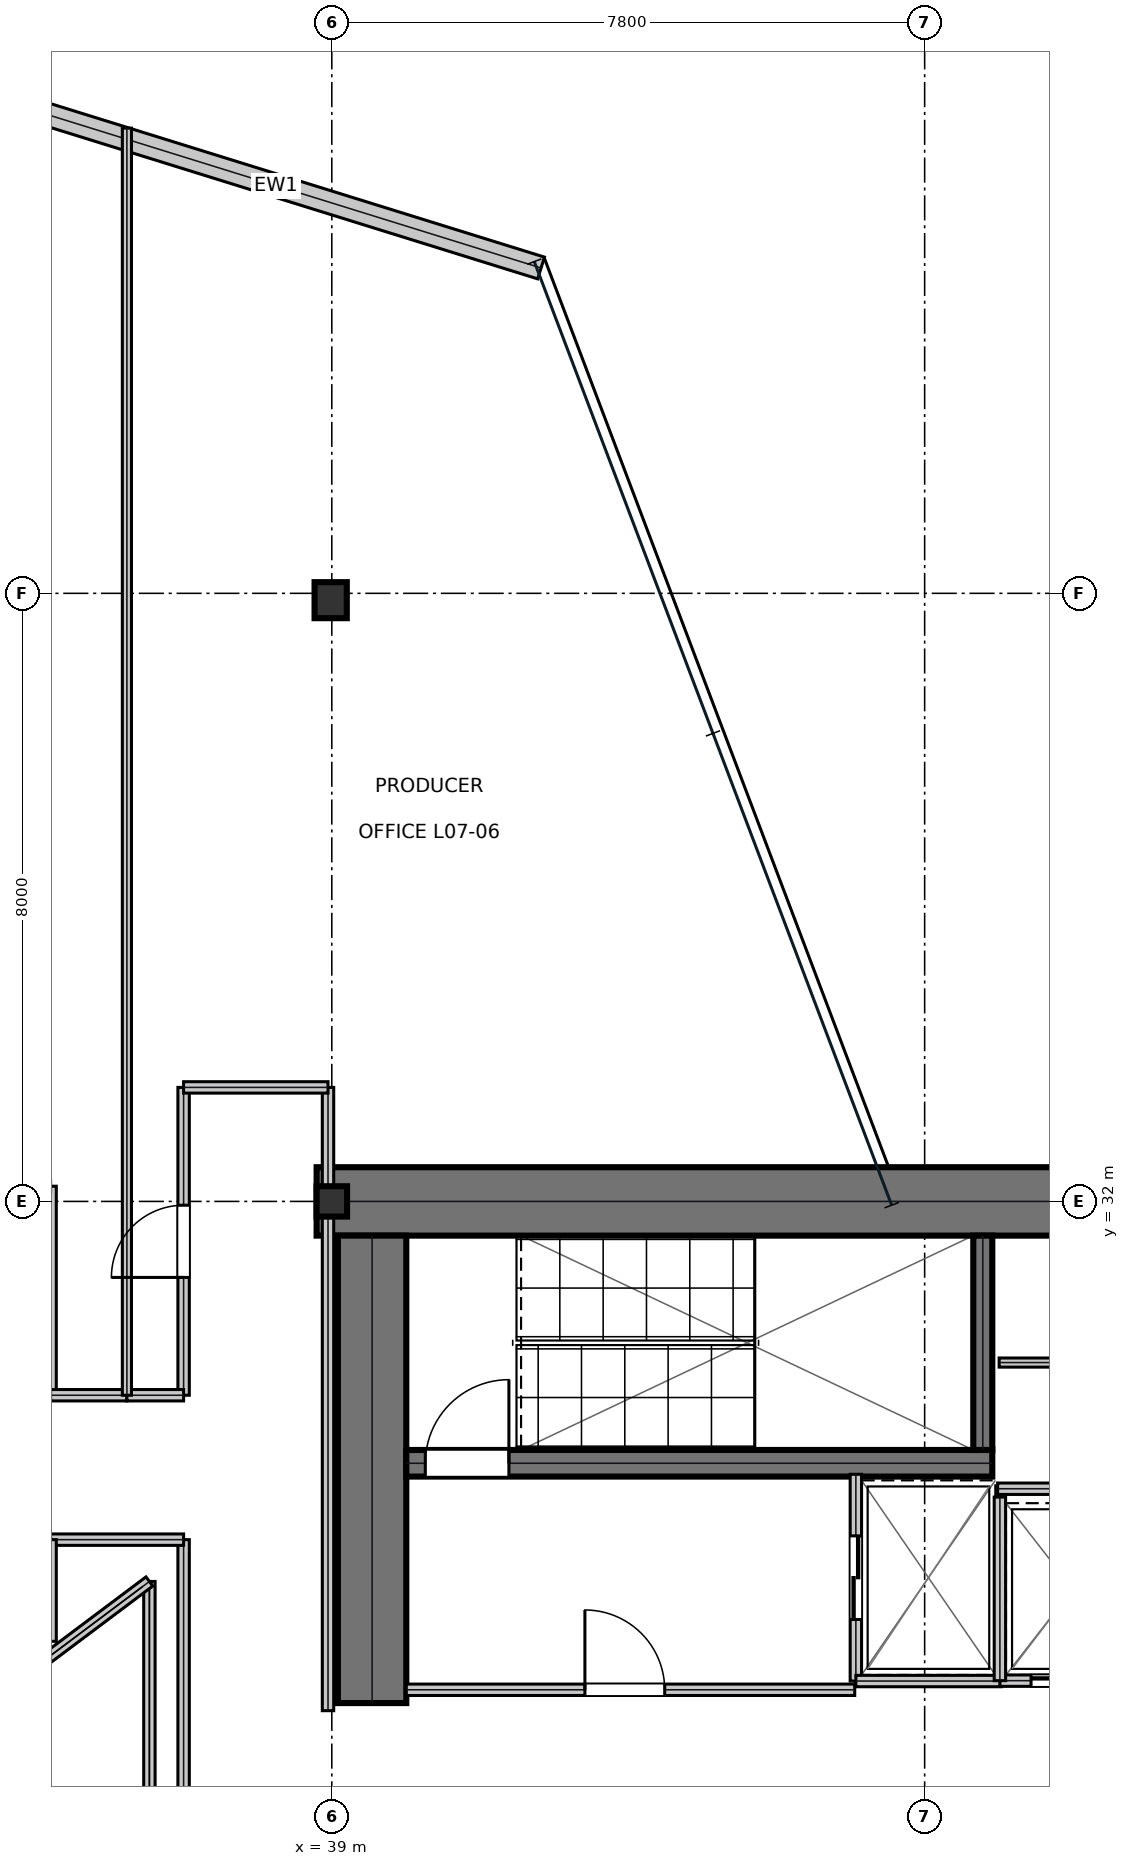
"""IFC4 building model, lengths in metres.
Left out: names, types, materials, properties, quantities, classifications, styles, units other than length and angle.
Written with IfcOpenShell. Run it as: python <this file> out.ifc"""

import sys

from ifc_helpers import new_model, si_unit, direction, frame, frame_2d, origin, origin_2d, place, context, subcontext, project, spatial, rectangle, i_section, extrude, element, fill, save


model = new_model("IFC4")
c1 = context("Model", 3, precision=1e-05, world=origin(), true_north=direction((0.0, 1.0)))
c2 = subcontext(c1, "Body", "Model", "MODEL_VIEW")
j1 = project(units=[si_unit("LENGTHUNIT", "METRE"), si_unit("PLANEANGLEUNIT", "RADIAN")], contexts=[c1])
p1 = place(None, origin())
s1 = spatial("IfcSite", under=j1, at=p1, CompositionType="ELEMENT")
p2 = place(p1, origin())
s2 = spatial("IfcBuilding", under=s1, at=p2, CompositionType="ELEMENT")
p3 = place(p2, frame((0.0, 0.0, 37.8)))
s3 = spatial("IfcBuildingStorey", under=s2, at=p3, CompositionType="ELEMENT", Elevation=37.8)
p4 = place(p3, frame((38.8, 32.0, 0.0), z_axis=(0.0, 0.0, 1.0), x_axis=(1.0, 0.0, 0.0)))
e1 = element("IfcWall", 1, at=p4, inside=s3, PredefinedType="SHEAR", context=c2, shape_type="SweptSolid", body=[
    extrude(rectangle(XDim=16.0, YDim=0.9, at=frame_2d((8.0, 0.0))), origin(), (0.0, 0.0, 1.0), 3.81),
])
p5 = place(p3, frame((39.53, 25.4, 0.0), z_axis=(0.0, 0.0, 1.0), x_axis=(0.0, 1.0, 0.0)))
e2 = element("IfcWall", 2, at=p5, inside=s3, PredefinedType="SHEAR", context=c2, shape_type="SweptSolid", body=[
    extrude(rectangle(XDim=6.15, YDim=0.9, at=frame_2d((3.075, 0.0))), origin(), (0.0, 0.0, 1.0), 3.81),
])
p6 = place(p3, frame((39.98, 28.555, 0.0), z_axis=(0.0, 0.0, 1.0), x_axis=(1.0, 0.0, 0.0)))
e3 = element("IfcWall", 3, at=p6, inside=s3, PredefinedType="SHEAR", context=c2, shape_type="SweptSolid", body=[
    extrude(rectangle(XDim=7.71, YDim=0.35, at=frame_2d((3.855, 0.0))), origin(), (0.0, 0.0, 1.0), 3.81),
])
p7 = place(p6, frame((0.25, 0.0, 0.0)))
e4 = element("IfcOpeningElement", 4, at=p7, cuts=e3, PredefinedType="OPENING", context=c2, shape_type="SweptSolid", body=[
    extrude(rectangle(XDim=1.1, YDim=2.15, at=frame_2d((0.55, 1.075))), frame((0.0, 0.185, 0.0), z_axis=(0.0, -1.0, 0.0), x_axis=(1.0, 0.0, 0.0)), (0.0, 0.0, 1.0), 0.37),
])
p8 = place(p3, frame((47.565, 28.73, 0.0), z_axis=(0.0, 0.0, 1.0), x_axis=(0.0, 1.0, 0.0)))
e5 = element("IfcWall", 5, at=p8, inside=s3, PredefinedType="SHEAR", context=c2, shape_type="SweptSolid", body=[
    extrude(rectangle(XDim=2.82, YDim=0.25, at=frame_2d((1.41, 0.0))), origin(), (0.0, 0.0, 1.0), 3.81),
])
p9 = place(p3, frame((39.0, 32.0, 0.0), z_axis=(0.0, 0.0, 1.0), x_axis=(1.0, 0.0, 0.0)))
e6 = element("IfcColumn", 6, at=p9, inside=s3, PredefinedType="COLUMN", context=c2, shape_type="SweptSolid", body=[
    extrude(i_section(OverallWidth=0.401, OverallDepth=0.399, WebThickness=0.025, FlangeThickness=0.04, at=origin_2d()), origin(), (0.0, 0.0, 1.0), 4.044),
])
p10 = place(p3, frame((38.985, 39.91, 0.016), z_axis=(0.0, 0.0, 1.0), x_axis=(1.0, 0.0, 0.0)))
e7 = element("IfcColumn", 7, at=p10, inside=s3, PredefinedType="COLUMN", context=c2, shape_type="SweptSolid", body=[
    extrude(i_section(OverallWidth=0.424, OverallDepth=0.474, WebThickness=0.048, FlangeThickness=0.077, at=origin_2d()), origin(), (0.0, 0.0, 1.0), 4.018),
])
p11 = place(p3, frame((41.753, 44.28, 0.0), z_axis=(0.0, 0.0, 1.0), x_axis=(-0.954957033511, 0.296744105498, 0.0)))
e8 = element("IfcWall", 8, at=p11, inside=s3, PredefinedType="STANDARD", context=c2, shape_type="SweptSolid", body=[
    extrude(rectangle(XDim=7.302, YDim=0.3, at=frame_2d((3.651, 0.0))), origin(), (0.0, 0.0, 1.0), 3.81),
])
p12 = place(p3, frame((39.98, 25.575, 0.0), z_axis=(0.0, 0.0, 1.0), x_axis=(1.0, 0.0, 0.0)))
e9 = element("IfcWall", 9, at=p12, inside=s3, PredefinedType="PARTITIONING", context=c2, shape_type="SweptSolid", body=[
    extrude(rectangle(XDim=5.9, YDim=0.15, at=frame_2d((2.95, 0.0))), origin(), (0.0, 0.0, 1.0), 3.81),
])
p13 = place(p12, frame((2.35, 0.0, 0.0)))
e10 = element("IfcOpeningElement", 10, at=p13, cuts=e9, PredefinedType="OPENING", context=c2, shape_type="SweptSolid", body=[
    extrude(rectangle(XDim=1.05, YDim=2.15, at=frame_2d((0.525, 1.075))), frame((0.0, 0.085, 0.0), z_axis=(0.0, -1.0, 0.0), x_axis=(1.0, 0.0, 0.0)), (0.0, 0.0, 1.0), 0.17),
])
p14 = place(p3, frame((45.895, 25.69, 0.0), z_axis=(0.0, 0.0, 1.0), x_axis=(0.0, 1.0, 0.0)))
e11 = element("IfcWall", 11, at=p14, inside=s3, PredefinedType="PARTITIONING", context=c2, shape_type="SweptSolid", body=[
    extrude(rectangle(XDim=2.72, YDim=0.15, at=frame_2d((1.36, 0.0))), origin(), (0.0, 0.0, 1.0), 3.81),
])
p15 = place(p14, frame((0.81, 0.0, 0.0)))
e12 = element("IfcOpeningElement", 12, at=p15, cuts=e11, PredefinedType="OPENING", context=c2, shape_type="SweptSolid", body=[
    extrude(rectangle(XDim=1.1, YDim=2.15, at=frame_2d((0.55, 1.075))), frame((0.0, 0.085, 0.0), z_axis=(0.0, -1.0, 0.0), x_axis=(1.0, 0.0, 0.0)), (0.0, 0.0, 1.0), 0.17),
])
p16 = place(p3, frame((45.895, 25.69, 0.0), z_axis=(0.0, 0.0, 1.0), x_axis=(1.0, 0.0, 0.0)))
e13 = element("IfcWall", 13, at=p16, inside=s3, PredefinedType="PARTITIONING", context=c2, shape_type="SweptSolid", body=[
    extrude(rectangle(XDim=1.915, YDim=0.15, at=frame_2d((0.958, 0.0))), origin(), (0.0, 0.0, 1.0), 3.81),
])
p17 = place(p3, frame((47.79, 25.695, 0.0), z_axis=(0.0, 0.0, 1.0), x_axis=(1.0, 0.0, 0.0)))
e14 = element("IfcWall", 14, at=p17, inside=s3, PredefinedType="PARTITIONING", context=c2, shape_type="SweptSolid", body=[
    extrude(rectangle(XDim=1.92, YDim=0.15, at=frame_2d((0.96, 0.0))), origin(), (0.0, 0.0, 1.0), 3.81),
])
p18 = place(p17, frame((0.41, 0.0, 0.0)))
e15 = element("IfcOpeningElement", 15, at=p18, cuts=e14, PredefinedType="OPENING", context=c2, shape_type="SweptSolid", body=[
    extrude(rectangle(XDim=1.1, YDim=2.15, at=frame_2d((0.55, 1.075))), frame((0.0, 0.085, 0.0), z_axis=(0.0, -1.0, 0.0), x_axis=(1.0, 0.0, 0.0)), (0.0, 0.0, 1.0), 0.17),
])
p19 = place(p3, frame((47.79, 25.695, 0.0), z_axis=(0.0, 0.0, 1.0), x_axis=(0.0, 1.0, 0.0)))
e16 = element("IfcWall", 16, at=p19, inside=s3, PredefinedType="PARTITIONING", context=c2, shape_type="SweptSolid", body=[
    extrude(rectangle(XDim=2.415, YDim=0.15, at=frame_2d((1.208, 0.0))), origin(), (0.0, 0.0, 1.0), 3.81),
])
p20 = place(p3, frame((47.76, 28.22, 0.0), z_axis=(0.0, 0.0, 1.0), x_axis=(1.0, 0.0, 0.0)))
e17 = element("IfcWall", 17, at=p20, inside=s3, PredefinedType="PARTITIONING", context=c2, shape_type="SweptSolid", body=[
    extrude(rectangle(XDim=1.96, YDim=0.15, at=frame_2d((0.98, 0.0))), origin(), (0.0, 0.0, 1.0), 3.81),
])
p21 = place(p3, frame((47.78, 29.88, 0.0), z_axis=(0.0, 0.0, 1.0), x_axis=(1.0, 0.0, 0.0)))
e18 = element("IfcWall", 18, at=p21, inside=s3, PredefinedType="PARTITIONING", context=c2, shape_type="SweptSolid", body=[
    extrude(rectangle(XDim=1.92, YDim=0.12, at=frame_2d((0.96, 0.0))), origin(), (0.0, 0.0, 1.0), 3.81),
])
p22 = place(p3, frame((37.05, 14.5, 0.0), z_axis=(0.0, 0.0, 1.0), x_axis=(0.0, 1.0, 0.0)))
e19 = element("IfcWall", 19, at=p22, inside=s3, PredefinedType="PARTITIONING", context=c2, shape_type="SweptSolid", body=[
    extrude(rectangle(XDim=13.05, YDim=0.15, at=frame_2d((6.525, 0.0))), origin(), (0.0, 0.0, 1.0), 3.181),
])
p23 = place(p22, frame((4.61, 0.0, 0.0)))
e20 = element("IfcOpeningElement", 20, at=p23, cuts=e19, PredefinedType="OPENING", context=c2, shape_type="SweptSolid", body=[
    extrude(rectangle(XDim=0.95, YDim=2.15, at=frame_2d((0.475, 1.075))), frame((0.0, 0.085, 0.0), z_axis=(0.0, -1.0, 0.0), x_axis=(1.0, 0.0, 0.0)), (0.0, 0.0, 1.0), 0.17),
])
p24 = place(p3, frame((37.05, 29.45, 0.0), z_axis=(0.0, 0.0, 1.0), x_axis=(0.0, 1.0, 0.0)))
e21 = element("IfcWall", 21, at=p24, inside=s3, PredefinedType="PARTITIONING", context=c2, shape_type="SweptSolid", body=[
    extrude(rectangle(XDim=4.05, YDim=0.15, at=frame_2d((2.025, 0.0))), origin(), (0.0, 0.0, 1.0), 3.181),
])
p25 = place(p24, frame((1.55, 0.0, 0.0)))
e22 = element("IfcOpeningElement", 22, at=p25, cuts=e21, PredefinedType="OPENING", context=c2, shape_type="SweptSolid", body=[
    extrude(rectangle(XDim=0.95, YDim=2.15, at=frame_2d((0.475, 1.075))), frame((0.0, 0.085, 0.0), z_axis=(0.0, -1.0, 0.0), x_axis=(1.0, 0.0, 0.0)), (0.0, 0.0, 1.0), 0.17),
])
p26 = place(p3, frame((35.3, 27.55, 0.0), z_axis=(0.0, 0.0, 1.0), x_axis=(1.0, 0.0, 0.0)))
e23 = element("IfcWall", 23, at=p26, inside=s3, PredefinedType="PARTITIONING", context=c2, shape_type="SweptSolid", body=[
    extrude(rectangle(XDim=1.75, YDim=0.15, at=frame_2d((0.875, 0.0))), origin(), (0.0, 0.0, 1.0), 3.391),
])
p27 = place(p3, frame((35.3, 26.212, 0.0), z_axis=(0.0, 0.0, 1.0), x_axis=(0.0, 1.0, 0.0)))
e24 = element("IfcWall", 24, at=p27, inside=s3, PredefinedType="PARTITIONING", context=c2, shape_type="SweptSolid", body=[
    extrude(rectangle(XDim=1.338, YDim=0.15, at=frame_2d((0.669, 0.0))), origin(), (0.0, 0.0, 1.0), 3.81),
])
p28 = place(p3, frame((35.3, 29.45, 0.0), z_axis=(0.0, 0.0, 1.0), x_axis=(0.0, 1.0, 0.0)))
e25 = element("IfcWall", 25, at=p28, inside=s3, PredefinedType="PARTITIONING", context=c2, shape_type="SweptSolid", body=[
    extrude(rectangle(XDim=2.75, YDim=0.15, at=frame_2d((1.375, 0.0))), origin(), (0.0, 0.0, 1.0), 3.181),
])
p29 = place(p3, frame((35.3, 29.45, 0.0), z_axis=(0.0, 0.0, 1.0), x_axis=(1.0, 0.0, 0.0)))
e26 = element("IfcWall", 26, at=p29, inside=s3, PredefinedType="PARTITIONING", context=c2, shape_type="SweptSolid", body=[
    extrude(rectangle(XDim=1.004, YDim=0.15, at=frame_2d((0.502, 0.0))), origin(), (0.0, 0.0, 1.0), 3.81),
])
p30 = place(p3, frame((38.95, 25.3, 0.0), z_axis=(0.0, 0.0, 1.0), x_axis=(0.0, 1.0, 0.0)))
e27 = element("IfcWall", 27, at=p30, inside=s3, PredefinedType="PARTITIONING", context=c2, shape_type="SweptSolid", body=[
    extrude(rectangle(XDim=8.2, YDim=0.15, at=frame_2d((4.1, 0.0))), origin(), (0.0, 0.0, 1.0), 3.181),
])
p31 = place(p3, frame((37.05, 33.5, 0.0), z_axis=(0.0, 0.0, 1.0), x_axis=(1.0, 0.0, 0.0)))
e28 = element("IfcWall", 28, at=p31, inside=s3, PredefinedType="PARTITIONING", context=c2, shape_type="SweptSolid", body=[
    extrude(rectangle(XDim=1.9, YDim=0.15, at=frame_2d((0.95, 0.0))), origin(), (0.0, 0.0, 1.0), 3.81),
])
p32 = place(p3, frame((36.304, 29.45, 0.0), z_axis=(0.0, 0.0, 1.0), x_axis=(1.0, 0.0, 0.0)))
e29 = element("IfcWall", 29, at=p32, inside=s3, PredefinedType="PARTITIONING", context=c2, shape_type="SweptSolid", body=[
    extrude(rectangle(XDim=0.746, YDim=0.15, at=frame_2d((0.373, 0.0))), origin(), (0.0, 0.0, 1.0), 3.81),
])
p33 = place(p3, frame((36.304, 29.45, 0.0), z_axis=(0.0, 0.0, 1.0), x_axis=(0.0, 1.0, 0.0)))
e30 = element("IfcWall", 30, at=p33, inside=s3, PredefinedType="PARTITIONING", context=c2, shape_type="SweptSolid", body=[
    extrude(rectangle(XDim=16.67, YDim=0.12, at=frame_2d((8.335, 0.0))), origin(), (0.0, 0.0, 1.0), 3.181),
])
p34 = place(p3, frame((36.6, 21.0, 0.0), z_axis=(0.0, 0.0, 1.0), x_axis=(0.0, 1.0, 0.0)))
e31 = element("IfcWall", 31, at=p34, inside=s3, PredefinedType="MOVABLE", context=c2, shape_type="SweptSolid", body=[
    extrude(rectangle(XDim=6.0, YDim=0.15, at=frame_2d((3.0, 0.0))), origin(), (0.0, 0.0, 1.0), 3.81),
])
p35 = place(p3, frame((36.6, 27.0, 0.0), z_axis=(0.0, 0.0, 1.0), x_axis=(-0.8, -0.6, 0.0)))
e32 = element("IfcWall", 32, at=p35, inside=s3, PredefinedType="MOVABLE", context=c2, shape_type="SweptSolid", body=[
    extrude(rectangle(XDim=5.0, YDim=0.15, at=frame_2d((2.5, 0.0))), origin(), (0.0, 0.0, 1.0), 3.81),
])
p36 = place(p13, origin())
e33 = element("IfcDoor", 33, at=p36, inside=s3, OperationType="SINGLE_SWING_LEFT", PredefinedType="DOOR", context=c2, shape_type="SweptSolid", body=[
    extrude(rectangle(XDim=1.05, YDim=2.15, at=frame_2d((0.525, 1.075))), frame((0.0, 0.025, 0.0), z_axis=(0.0, -1.0, 0.0), x_axis=(1.0, 0.0, 0.0)), (0.0, 0.0, 1.0), 0.05),
])
fill(e10, e33)
p37 = place(p15, frame((1.1, 0.0, 0.0), z_axis=(0.0, 0.0, 1.0), x_axis=(-1.0, 0.0, 0.0)))
e34 = element("IfcDoor", 34, at=p37, inside=s3, OperationType="DOUBLE_DOOR_SLIDING", PredefinedType="DOOR", context=c2, shape_type="SweptSolid", body=[
    extrude(rectangle(XDim=1.1, YDim=2.15, at=frame_2d((0.55, 1.075))), frame((0.0, 0.025, 0.0), z_axis=(0.0, -1.0, 0.0), x_axis=(1.0, 0.0, 0.0)), (0.0, 0.0, 1.0), 0.05),
])
fill(e12, e34)
p38 = place(p18, frame((1.1, 0.0, 0.0), z_axis=(0.0, 0.0, 1.0), x_axis=(-1.0, 0.0, 0.0)))
e35 = element("IfcDoor", 35, at=p38, inside=s3, OperationType="DOUBLE_DOOR_SLIDING", PredefinedType="DOOR", context=c2, shape_type="SweptSolid", body=[
    extrude(rectangle(XDim=1.1, YDim=2.15, at=frame_2d((0.55, 1.075))), frame((0.0, 0.025, 0.0), z_axis=(0.0, -1.0, 0.0), x_axis=(1.0, 0.0, 0.0)), (0.0, 0.0, 1.0), 0.05),
])
fill(e15, e35)
p39 = place(p25, origin())
e36 = element("IfcDoor", 36, at=p39, inside=s3, OperationType="SINGLE_SWING_LEFT", PredefinedType="DOOR", context=c2, shape_type="SweptSolid", body=[
    extrude(rectangle(XDim=0.95, YDim=2.15, at=frame_2d((0.475, 1.075))), frame((0.0, 0.025, 0.0), z_axis=(0.0, -1.0, 0.0), x_axis=(1.0, 0.0, 0.0)), (0.0, 0.0, 1.0), 0.05),
])
fill(e22, e36)
p40 = place(p7, origin())
e37 = element("IfcDoor", 37, at=p40, inside=s3, OperationType="SINGLE_SWING_RIGHT", PredefinedType="DOOR", context=c2, shape_type="SweptSolid", body=[
    extrude(rectangle(XDim=1.1, YDim=2.15, at=frame_2d((0.55, 1.075))), frame((0.0, 0.025, 0.0), z_axis=(0.0, -1.0, 0.0), x_axis=(1.0, 0.0, 0.0)), (0.0, 0.0, 1.0), 0.05),
])
fill(e4, e37)
save(model, sys.argv[1])
